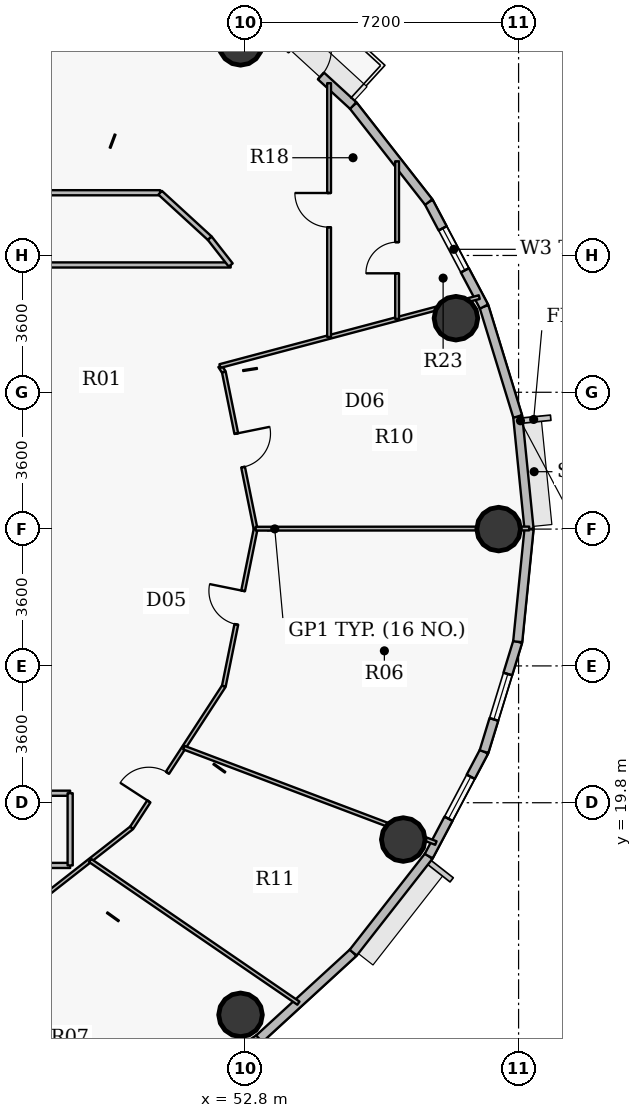
"""IFC4 building model, lengths in metres.
Left out: names, types, materials, properties, quantities, classifications, styles, units other than length and angle.
Written with IfcOpenShell. Run it as: python <this file> out.ifc"""

import sys

from ifc_helpers import new_model, si_unit, direction, frame, frame_2d, origin, origin_2d, place, context, subcontext, project, spatial, rectangle, hollow_circle, extrude, source, transform, mapped, element, fill, save


model = new_model("IFC4")
c1 = context("Model", 3, precision=1e-05, world=origin(), true_north=direction((0.0, 1.0)))
c2 = subcontext(c1, "Body", "Model", "MODEL_VIEW")
j1 = project(units=[si_unit("LENGTHUNIT", "METRE"), si_unit("PLANEANGLEUNIT", "RADIAN")], contexts=[c1])
p1 = place(None, origin())
s1 = spatial("IfcSite", under=j1, at=p1, CompositionType="ELEMENT")
p2 = place(p1, origin())
s2 = spatial("IfcBuilding", under=s1, at=p2, CompositionType="ELEMENT")
p3 = place(p2, frame((0.0, 0.0, 247.8)))
s3 = spatial("IfcBuildingStorey", under=s2, at=p3, CompositionType="ELEMENT", Elevation=247.8)
for number, where, z_axis, x_axis in (
    (1, (59.475, 27.0, 0.0), (0.0, 0.0, 1.0), (1.0, 0.0, 0.0)),
    (2, (58.351, 32.549, 0.0), (0.0, 0.0, 1.0), (1.0, 0.0, 0.0)),
    (3, (52.683, 39.781, 0.0), (0.0, 0.0, 1.0), (1.0, 0.0, 0.0)),
    (4, (52.683, 14.219, 0.0), (0.0, 0.0, 1.0), (1.0, 0.0, 0.0)),
    (5, (56.965, 18.831, 0.0), (0.0, 0.0, 1.0), (1.0, 0.0, 0.0)),
):
    element("IfcColumn", number, at=place(p3, frame(where, z_axis=z_axis, x_axis=x_axis)), inside=s3, PredefinedType="COLUMN", context=c2, shape_type="SweptSolid", body=[
        extrude(hollow_circle(Radius=0.575, WallThickness=0.036, at=origin_2d()), origin(), (0.0, 0.0, 1.0), 3.75),
    ])
p4 = place(p3, frame((59.977, 29.964, 0.0), z_axis=(0.0, 0.0, 1.0), x_axis=(0.099990595253, -0.994988382274, 0.0)))
e6 = element("IfcWall", 6, at=p4, inside=s3, PredefinedType="SOLIDWALL", context=c2, shape_type="SweptSolid", body=[
    extrude(rectangle(XDim=2.979, YDim=0.24, at=frame_2d((1.489, 0.0))), origin(), (0.0, 0.0, 1.0), 3.5),
])
p5 = place(p3, frame((59.09, 32.856, 0.0), z_axis=(0.0, 0.0, 1.0), x_axis=(0.293132907334, -0.95607170162, 0.0)))
e7 = element("IfcWall", 7, at=p5, inside=s3, PredefinedType="SOLIDWALL", context=c2, shape_type="SweptSolid", body=[
    extrude(rectangle(XDim=3.025, YDim=0.24, at=frame_2d((1.512, 0.0))), origin(), (0.0, 0.0, 1.0), 3.5),
])
p6 = place(p3, frame((57.636, 35.605, 0.0), z_axis=(0.0, 0.0, 1.0), x_axis=(0.46766049993, -0.883908172157, 0.0)))
e8 = element("IfcWall", 8, at=p6, inside=s3, PredefinedType="SOLIDWALL", context=c2, shape_type="SweptSolid", body=[
    extrude(rectangle(XDim=3.11, YDim=0.24, at=frame_2d((1.555, 0.0))), origin(), (0.0, 0.0, 1.0), 3.5),
])
p7 = place(p6, frame((0.782, 0.0, 0.9)))
e9 = element("IfcOpeningElement", 9, at=p7, cuts=e8, PredefinedType="OPENING", context=c2, shape_type="SweptSolid", body=[
    extrude(rectangle(XDim=1.25, YDim=1.65, at=origin_2d()), frame((0.625, 0.13, 0.825), z_axis=(0.0, -1.0, 0.0), x_axis=(1.0, 0.0, 0.0)), (0.0, 0.0, 1.0), 0.26),
])
p8 = place(p3, frame((55.648, 38.145, 0.0), z_axis=(0.0, 0.0, 1.0), x_axis=(0.616312344705, -0.787501805562, 0.0)))
e10 = element("IfcWall", 10, at=p8, inside=s3, PredefinedType="SOLIDWALL", context=c2, shape_type="SweptSolid", body=[
    extrude(rectangle(XDim=3.225, YDim=0.24, at=frame_2d((1.612, 0.0))), origin(), (0.0, 0.0, 1.0), 3.5),
])
p9 = place(p3, frame((53.176, 40.411, 0.0), z_axis=(0.0, 0.0, 1.0), x_axis=(0.737123922599, -0.675757591694, 0.0)))
e11 = element("IfcWall", 11, at=p9, inside=s3, PredefinedType="SOLIDWALL", context=c2, shape_type="SweptSolid", body=[
    extrude(rectangle(XDim=3.354, YDim=0.24, at=frame_2d((1.677, 0.0))), origin(), (0.0, 0.0, 1.0), 3.5),
])
p10 = place(p9, frame((1.152, 0.0, 0.0)))
e12 = element("IfcOpeningElement", 12, at=p10, cuts=e11, PredefinedType="OPENING", context=c2, shape_type="SweptSolid", body=[
    extrude(rectangle(XDim=1.05, YDim=2.15, at=origin_2d()), frame((0.525, 0.13, 1.075), z_axis=(0.0, -1.0, 0.0), x_axis=(1.0, 0.0, 0.0)), (0.0, 0.0, 1.0), 0.26),
])
p11 = place(p3, frame((53.176, 13.589, 0.0), z_axis=(0.0, 0.0, 1.0), x_axis=(-0.831262496074, -0.555880079352, 0.0)))
e13 = element("IfcWall", 13, at=p11, inside=s3, PredefinedType="SOLIDWALL", context=c2, shape_type="SweptSolid", body=[
    extrude(rectangle(XDim=3.484, YDim=0.24, at=frame_2d((1.742, 0.0))), origin(), (0.0, 0.0, 1.0), 3.5),
])
p12 = place(p3, frame((55.648, 15.855, 0.0), z_axis=(0.0, 0.0, 1.0), x_axis=(-0.737123922599, -0.675757591694, 0.0)))
e14 = element("IfcWall", 14, at=p12, inside=s3, PredefinedType="SOLIDWALL", context=c2, shape_type="SweptSolid", body=[
    extrude(rectangle(XDim=3.354, YDim=0.24, at=frame_2d((1.677, 0.0))), origin(), (0.0, 0.0, 1.0), 3.5),
])
p13 = place(p3, frame((57.636, 18.395, 0.0), z_axis=(0.0, 0.0, 1.0), x_axis=(-0.616312344705, -0.787501805562, 0.0)))
e15 = element("IfcWall", 15, at=p13, inside=s3, PredefinedType="SOLIDWALL", context=c2, shape_type="SweptSolid", body=[
    extrude(rectangle(XDim=3.225, YDim=0.24, at=frame_2d((1.612, 0.0))), origin(), (0.0, 0.0, 1.0), 3.5),
])
p14 = place(p3, frame((59.09, 21.144, 0.0), z_axis=(0.0, 0.0, 1.0), x_axis=(-0.46766049993, -0.883908172157, 0.0)))
e16 = element("IfcWall", 16, at=p14, inside=s3, PredefinedType="SOLIDWALL", context=c2, shape_type="SweptSolid", body=[
    extrude(rectangle(XDim=3.11, YDim=0.24, at=frame_2d((1.555, 0.0))), origin(), (0.0, 0.0, 1.0), 3.5),
])
p15 = place(p14, frame((0.748, 0.0, 0.9)))
e17 = element("IfcOpeningElement", 17, at=p15, cuts=e16, PredefinedType="OPENING", context=c2, shape_type="SweptSolid", body=[
    extrude(rectangle(XDim=1.25, YDim=1.65, at=origin_2d()), frame((0.625, 0.13, 0.825), z_axis=(0.0, -1.0, 0.0), x_axis=(1.0, 0.0, 0.0)), (0.0, 0.0, 1.0), 0.26),
])
p16 = place(p3, frame((59.977, 24.036, 0.0), z_axis=(0.0, 0.0, 1.0), x_axis=(-0.293132907334, -0.95607170162, 0.0)))
e18 = element("IfcWall", 18, at=p16, inside=s3, PredefinedType="SOLIDWALL", context=c2, shape_type="SweptSolid", body=[
    extrude(rectangle(XDim=3.025, YDim=0.24, at=frame_2d((1.512, 0.0))), origin(), (0.0, 0.0, 1.0), 3.5),
])
p17 = place(p16, frame((0.887, 0.0, 0.9)))
e19 = element("IfcOpeningElement", 19, at=p17, cuts=e18, PredefinedType="OPENING", context=c2, shape_type="SweptSolid", body=[
    extrude(rectangle(XDim=1.25, YDim=1.65, at=origin_2d()), frame((0.625, 0.13, 0.825), z_axis=(0.0, -1.0, 0.0), x_axis=(1.0, 0.0, 0.0)), (0.0, 0.0, 1.0), 0.26),
])
p18 = place(p3, frame((60.275, 27.0, 0.0), z_axis=(0.0, 0.0, 1.0), x_axis=(-0.099990595253, -0.994988382274, 0.0)))
e20 = element("IfcWall", 20, at=p18, inside=s3, PredefinedType="SOLIDWALL", context=c2, shape_type="SweptSolid", body=[
    extrude(rectangle(XDim=2.979, YDim=0.24, at=frame_2d((1.489, 0.0))), origin(), (0.0, 0.0, 1.0), 3.5),
])
p19 = place(p3, frame((24.35, 18.15, 0.0), z_axis=(0.0, 0.0, 1.0), x_axis=(1.0, 0.0, 0.0)))
e21 = element("IfcWall", 21, at=p19, inside=s3, PredefinedType="PARTITIONING", context=c2, shape_type="SweptSolid", body=[
    extrude(rectangle(XDim=23.85, YDim=0.135, at=frame_2d((11.925, 0.0))), origin(), (0.0, 0.0, 1.0), 2.935),
])
p20 = place(p19, frame((10.168, 0.0, 0.0)))
e22 = element("IfcOpeningElement", 22, at=p20, cuts=e21, PredefinedType="OPENING", context=c2, shape_type="SweptSolid", body=[
    extrude(rectangle(XDim=1.0, YDim=2.15, at=origin_2d()), frame((0.5, 0.078, 1.075), z_axis=(0.0, -1.0, 0.0), x_axis=(1.0, 0.0, 0.0)), (0.0, 0.0, 1.0), 0.155),
])
p21 = place(p3, frame((24.35, 35.85, 0.0), z_axis=(0.0, 0.0, 1.0), x_axis=(1.0, 0.0, 0.0)))
e23 = element("IfcWall", 23, at=p21, inside=s3, PredefinedType="PARTITIONING", context=c2, shape_type="SweptSolid", body=[
    extrude(rectangle(XDim=26.218, YDim=0.135, at=frame_2d((13.109, 0.0))), origin(), (0.0, 0.0, 1.0), 2.935),
])
p22 = place(p21, frame((22.062, 0.0, 0.0)))
e24 = element("IfcOpeningElement", 24, at=p22, cuts=e23, PredefinedType="OPENING", context=c2, shape_type="SweptSolid", body=[
    extrude(rectangle(XDim=1.0, YDim=2.15, at=origin_2d()), frame((0.5, 0.078, 1.075), z_axis=(0.0, -1.0, 0.0), x_axis=(1.0, 0.0, 0.0)), (0.0, 0.0, 1.0), 0.155),
])
p23 = place(p21, frame((11.214, 0.0, 0.0)))
e25 = element("IfcOpeningElement", 25, at=p23, cuts=e23, PredefinedType="OPENING", context=c2, shape_type="SweptSolid", body=[
    extrude(rectangle(XDim=1.0, YDim=2.15, at=origin_2d()), frame((0.5, 0.078, 1.075), z_axis=(0.0, -1.0, 0.0), x_axis=(1.0, 0.0, 0.0)), (0.0, 0.0, 1.0), 0.155),
])
p24 = place(p3, frame((43.295, 35.85, 0.0), z_axis=(0.0, 0.0, 1.0), x_axis=(0.636076542552, 0.771625966395, 0.0)))
e26 = element("IfcWall", 26, at=p24, inside=s3, PredefinedType="PARTITIONING", context=c2, shape_type="SweptSolid", body=[
    extrude(rectangle(XDim=9.151, YDim=0.135, at=frame_2d((4.576, 0.0))), origin(), (0.0, 0.0, 1.0), 2.985),
])
p25 = place(p3, frame((45.8, 20.05, 0.0), z_axis=(0.0, 0.0, 1.0), x_axis=(1.0, 0.0, 0.0)))
e27 = element("IfcWall", 27, at=p25, inside=s3, PredefinedType="PARTITIONING", context=c2, shape_type="SweptSolid", body=[
    extrude(rectangle(XDim=2.4, YDim=0.135, at=frame_2d((1.2, 0.0))), origin(), (0.0, 0.0, 1.0), 3.5),
])
p26 = place(p3, frame((45.8, 33.95, 0.0), z_axis=(0.0, 0.0, 1.0), x_axis=(1.0, 0.0, 0.0)))
e28 = element("IfcWall", 28, at=p26, inside=s3, PredefinedType="PARTITIONING", context=c2, shape_type="SweptSolid", body=[
    extrude(rectangle(XDim=6.624, YDim=0.135, at=frame_2d((3.312, 0.0))), origin(), (0.0, 0.0, 1.0), 3.5),
])
p27 = place(p3, frame((46.039, 16.181, 0.0), z_axis=(0.0, 0.0, 1.0), x_axis=(0.787367569585, 0.616483828147, 0.0)))
e29 = element("IfcWall", 29, at=p27, inside=s3, PredefinedType="PARTITIONING", context=c2, shape_type="SweptSolid", body=[
    extrude(rectangle(XDim=4.799, YDim=0.1, at=frame_2d((2.399, 0.0))), origin(), (0.0, 0.0, 1.0), 2.935),
])
p28 = place(p27, frame((0.582, 0.0, 0.0)))
e30 = element("IfcOpeningElement", 30, at=p28, cuts=e29, PredefinedType="OPENING", context=c2, shape_type="SweptSolid", body=[
    extrude(rectangle(XDim=0.9, YDim=2.1, at=origin_2d()), frame((0.45, 0.06, 1.05), z_axis=(0.0, -1.0, 0.0), x_axis=(1.0, 0.0, 0.0)), (0.0, 0.0, 1.0), 0.12),
])
p29 = place(p3, frame((48.2, 18.15, 0.0), z_axis=(0.0, 0.0, 1.0), x_axis=(0.0, 1.0, 0.0)))
e31 = element("IfcWall", 31, at=p29, inside=s3, PredefinedType="PARTITIONING", context=c2, shape_type="SweptSolid", body=[
    extrude(rectangle(XDim=1.9, YDim=0.135, at=frame_2d((0.95, 0.0))), origin(), (0.0, 0.0, 1.0), 3.5),
])
p30 = place(p3, frame((48.724, 18.283, 0.0), z_axis=(0.0, 0.0, 1.0), x_axis=(0.824946647061, -0.565210606325, 0.0)))
e32 = element("IfcWall", 32, at=p30, inside=s3, PredefinedType="PARTITIONING", context=c2, shape_type="SweptSolid", body=[
    extrude(rectangle(XDim=6.646, YDim=0.1, at=frame_2d((3.323, 0.0))), origin(), (0.0, 0.0, 1.0), 2.985),
])
p31 = place(p3, frame((49.818, 19.139, 0.0), z_axis=(0.0, 0.0, 1.0), x_axis=(0.545406924684, 0.83817139447, 0.0)))
e33 = element("IfcWall", 33, at=p31, inside=s3, PredefinedType="PARTITIONING", context=c2, shape_type="SweptSolid", body=[
    extrude(rectangle(XDim=4.448, YDim=0.1, at=frame_2d((2.224, 0.0))), origin(), (0.0, 0.0, 1.0), 2.935),
])
p32 = place(p31, frame((0.829, 0.0, 0.0)))
e34 = element("IfcOpeningElement", 34, at=p32, cuts=e33, PredefinedType="OPENING", context=c2, shape_type="SweptSolid", body=[
    extrude(rectangle(XDim=0.9, YDim=2.1, at=origin_2d()), frame((0.45, 0.06, 1.05), z_axis=(0.0, -1.0, 0.0), x_axis=(1.0, 0.0, 0.0)), (0.0, 0.0, 1.0), 0.12),
])
p33 = place(p3, frame((50.568, 35.85, 0.0), z_axis=(0.0, 0.0, 1.0), x_axis=(0.737102657331, -0.675780787353, 0.0)))
e35 = element("IfcWall", 35, at=p33, inside=s3, PredefinedType="PARTITIONING", context=c2, shape_type="SweptSolid", body=[
    extrude(rectangle(XDim=1.772, YDim=0.135, at=frame_2d((0.886, 0.0))), origin(), (0.0, 0.0, 1.0), 3.5),
])
p34 = place(p3, frame((51.192, 21.25, 0.0), z_axis=(0.0, 0.0, 1.0), x_axis=(0.935252375815, -0.353981628806, 0.0)))
e36 = element("IfcWall", 36, at=p34, inside=s3, PredefinedType="PARTITIONING", context=c2, shape_type="SweptSolid", body=[
    extrude(rectangle(XDim=7.092, YDim=0.1, at=frame_2d((3.546, 0.0))), origin(), (0.0, 0.0, 1.0), 2.935),
])
p35 = place(p3, frame((51.874, 34.653, 0.0), z_axis=(0.0, 0.0, 1.0), x_axis=(0.61628613448, -0.787522317429, 0.0)))
e37 = element("IfcWall", 37, at=p35, inside=s3, PredefinedType="PARTITIONING", context=c2, shape_type="SweptSolid", body=[
    extrude(rectangle(XDim=0.893, YDim=0.135, at=frame_2d((0.446, 0.0))), origin(), (0.0, 0.0, 1.0), 3.5),
])
p36 = place(p3, frame((52.142, 31.29, 0.0), z_axis=(0.0, 0.0, 1.0), x_axis=(0.545079581712, -0.838384309014, 0.0)))
e38 = element("IfcWall", 38, at=p36, inside=s3, PredefinedType="PARTITIONING", context=c2, shape_type="SweptSolid", body=[
    extrude(rectangle(XDim=0.188, YDim=0.1, at=frame_2d((0.094, 0.0))), origin(), (0.0, 0.0, 1.0), 2.935),
])
p37 = place(p3, frame((52.142, 31.29, 0.0), z_axis=(0.0, 0.0, 1.0), x_axis=(0.966448115653, 0.256861907939, 0.0)))
e39 = element("IfcWall", 39, at=p37, inside=s3, PredefinedType="PARTITIONING", context=c2, shape_type="SweptSolid", body=[
    extrude(rectangle(XDim=7.06, YDim=0.1, at=frame_2d((3.53, 0.0))), origin(), (0.0, 0.0, 1.0), 2.985),
])
p38 = place(p3, frame((52.244, 22.867, 0.0), z_axis=(0.0, 0.0, 1.0), x_axis=(0.198264809747, 0.980148491411, 0.0)))
e40 = element("IfcWall", 40, at=p38, inside=s3, PredefinedType="PARTITIONING", context=c2, shape_type="SweptSolid", body=[
    extrude(rectangle(XDim=4.216, YDim=0.1, at=frame_2d((2.108, 0.0))), origin(), (0.0, 0.0, 1.0), 2.935),
])
p39 = place(p38, frame((1.658, 0.0, 0.0)))
e41 = element("IfcOpeningElement", 41, at=p39, cuts=e40, PredefinedType="OPENING", context=c2, shape_type="SweptSolid", body=[
    extrude(rectangle(XDim=0.9, YDim=2.1, at=origin_2d()), frame((0.45, 0.06, 1.05), z_axis=(0.0, -1.0, 0.0), x_axis=(1.0, 0.0, 0.0)), (0.0, 0.0, 1.0), 0.12),
])
p40 = place(p3, frame((52.244, 31.133, 0.0), z_axis=(0.0, 0.0, 1.0), x_axis=(0.198259251193, -0.980149615781, 0.0)))
e42 = element("IfcWall", 42, at=p40, inside=s3, PredefinedType="PARTITIONING", context=c2, shape_type="SweptSolid", body=[
    extrude(rectangle(XDim=4.205, YDim=0.1, at=frame_2d((2.103, 0.0))), origin(), (0.0, 0.0, 1.0), 2.935),
])
p41 = place(p40, frame((1.653, 0.0, 0.0)))
e43 = element("IfcOpeningElement", 43, at=p41, cuts=e42, PredefinedType="OPENING", context=c2, shape_type="SweptSolid", body=[
    extrude(rectangle(XDim=0.9, YDim=2.1, at=origin_2d()), frame((0.45, 0.06, 1.05), z_axis=(0.0, -1.0, 0.0), x_axis=(1.0, 0.0, 0.0)), (0.0, 0.0, 1.0), 0.12),
])
p42 = place(p3, frame((53.082, 27.011, 0.0), z_axis=(0.0, 0.0, 1.0), x_axis=(0.999999792251, 0.000644592077, 0.0)))
e44 = element("IfcWall", 44, at=p42, inside=s3, PredefinedType="PARTITIONING", context=c2, shape_type="SweptSolid", body=[
    extrude(rectangle(XDim=7.196, YDim=0.1, at=frame_2d((3.598, 0.0))), origin(), (0.0, 0.0, 1.0), 2.935),
])
p43 = place(p3, frame((55.014, 32.053, 0.0), z_axis=(0.0, 0.0, 1.0), x_axis=(0.0, 1.0, 0.0)))
e45 = element("IfcWall", 45, at=p43, inside=s3, PredefinedType="PARTITIONING", context=c2, shape_type="SweptSolid", body=[
    extrude(rectangle(XDim=6.68, YDim=0.1, at=frame_2d((3.34, 0.0))), origin(), (0.0, 0.0, 1.0), 2.985),
])
p44 = place(p43, frame((2.89, 0.0, 0.0)))
e46 = element("IfcOpeningElement", 46, at=p44, cuts=e45, PredefinedType="OPENING", context=c2, shape_type="SweptSolid", body=[
    extrude(rectangle(XDim=0.9, YDim=2.1, at=origin_2d()), frame((0.45, 0.06, 1.05), z_axis=(0.0, -1.0, 0.0), x_axis=(1.0, 0.0, 0.0)), (0.0, 0.0, 1.0), 0.12),
])
p45 = place(p3, frame((56.803, 32.529, 0.0), z_axis=(0.0, 0.0, 1.0), x_axis=(0.0, 1.0, 0.0)))
e47 = element("IfcWall", 47, at=p45, inside=s3, PredefinedType="PARTITIONING", context=c2, shape_type="SweptSolid", body=[
    extrude(rectangle(XDim=4.148, YDim=0.1, at=frame_2d((2.074, 0.0))), origin(), (0.0, 0.0, 1.0), 2.985),
])
p46 = place(p45, frame((1.201, 0.0, 0.0)))
e48 = element("IfcOpeningElement", 48, at=p46, cuts=e47, PredefinedType="OPENING", context=c2, shape_type="SweptSolid", body=[
    extrude(rectangle(XDim=0.82, YDim=2.1, at=origin_2d()), frame((0.41, 0.06, 1.05), z_axis=(0.0, -1.0, 0.0), x_axis=(1.0, 0.0, 0.0)), (0.0, 0.0, 1.0), 0.12),
])
m1 = source(origin(), c2, "Body", "SweptSolid", [
    extrude(rectangle(XDim=1.25, YDim=1.65, at=origin_2d()), frame((0.625, 0.03, 0.825), z_axis=(0.0, -1.0, 0.0), x_axis=(1.0, 0.0, 0.0)), (0.0, 0.0, 1.0), 0.06),
])
p47 = place(p7, origin())
e49 = element("IfcWindow", 49, at=p47, inside=s3, PartitioningType="SINGLE_PANEL", PredefinedType="WINDOW", context=c2, shape_type="MappedRepresentation", body=[
    mapped(m1, transform((0.0, 0.0, 0.0), x_axis=(1.0, 0.0, 0.0), y_axis=(0.0, 1.0, 0.0), z_axis=(0.0, 0.0, 1.0), scale=1.0)),
])
fill(e9, e49)
m2 = source(origin(), c2, "Body", "SweptSolid", [
    extrude(rectangle(XDim=1.05, YDim=2.15, at=origin_2d()), frame((0.525, 0.025, 1.075), z_axis=(0.0, -1.0, 0.0), x_axis=(1.0, 0.0, 0.0)), (0.0, 0.0, 1.0), 0.05),
])
p48 = place(p10, origin())
e50 = element("IfcDoor", 50, at=p48, inside=s3, OperationType="SINGLE_SWING_LEFT", PredefinedType="DOOR", context=c2, shape_type="MappedRepresentation", body=[
    mapped(m2, transform((0.0, 0.0, 0.0), x_axis=(1.0, 0.0, 0.0), y_axis=(0.0, 1.0, 0.0), z_axis=(0.0, 0.0, 1.0), scale=1.0)),
])
fill(e12, e50)
p49 = place(p15, origin())
e51 = element("IfcWindow", 51, at=p49, inside=s3, PartitioningType="SINGLE_PANEL", PredefinedType="WINDOW", context=c2, shape_type="MappedRepresentation", body=[
    mapped(m1, transform((0.0, 0.0, 0.0), x_axis=(1.0, 0.0, 0.0), y_axis=(0.0, 1.0, 0.0), z_axis=(0.0, 0.0, 1.0), scale=1.0)),
])
fill(e17, e51)
p50 = place(p17, origin())
e52 = element("IfcWindow", 52, at=p50, inside=s3, PartitioningType="SINGLE_PANEL", PredefinedType="WINDOW", context=c2, shape_type="MappedRepresentation", body=[
    mapped(m1, transform((0.0, 0.0, 0.0), x_axis=(1.0, 0.0, 0.0), y_axis=(0.0, 1.0, 0.0), z_axis=(0.0, 0.0, 1.0), scale=1.0)),
])
fill(e19, e52)
m3 = source(origin(), c2, "Body", "SweptSolid", [
    extrude(rectangle(XDim=0.9, YDim=2.1, at=origin_2d()), frame((0.45, 0.025, 1.05), z_axis=(0.0, -1.0, 0.0), x_axis=(1.0, 0.0, 0.0)), (0.0, 0.0, 1.0), 0.05),
])
p51 = place(p32, origin())
e53 = element("IfcDoor", 53, at=p51, inside=s3, OperationType="SINGLE_SWING_LEFT", PredefinedType="DOOR", context=c2, shape_type="MappedRepresentation", body=[
    mapped(m3, transform((0.0, 0.0, 0.0), x_axis=(1.0, 0.0, 0.0), y_axis=(0.0, 1.0, 0.0), z_axis=(0.0, 0.0, 1.0), scale=1.0)),
])
fill(e34, e53)
p52 = place(p39, origin())
e54 = element("IfcDoor", 54, at=p52, inside=s3, OperationType="SINGLE_SWING_RIGHT", PredefinedType="DOOR", context=c2, shape_type="MappedRepresentation", body=[
    mapped(m3, transform((0.0, 0.0, 0.0), x_axis=(1.0, 0.0, 0.0), y_axis=(0.0, 1.0, 0.0), z_axis=(0.0, 0.0, 1.0), scale=1.0)),
])
fill(e41, e54)
p53 = place(p41, origin())
e55 = element("IfcDoor", 55, at=p53, inside=s3, OperationType="SINGLE_SWING_LEFT", PredefinedType="DOOR", context=c2, shape_type="MappedRepresentation", body=[
    mapped(m3, transform((0.0, 0.0, 0.0), x_axis=(1.0, 0.0, 0.0), y_axis=(0.0, 1.0, 0.0), z_axis=(0.0, 0.0, 1.0), scale=1.0)),
])
fill(e43, e55)
p54 = place(p44, origin())
e56 = element("IfcDoor", 56, at=p54, inside=s3, OperationType="SINGLE_SWING_RIGHT", PredefinedType="DOOR", context=c2, shape_type="MappedRepresentation", body=[
    mapped(m3, transform((0.0, 0.0, 0.0), x_axis=(1.0, 0.0, 0.0), y_axis=(0.0, 1.0, 0.0), z_axis=(0.0, 0.0, 1.0), scale=1.0)),
])
fill(e46, e56)
m4 = source(origin(), c2, "Body", "SweptSolid", [
    extrude(rectangle(XDim=0.82, YDim=2.1, at=origin_2d()), frame((0.41, 0.025, 1.05), z_axis=(0.0, -1.0, 0.0), x_axis=(1.0, 0.0, 0.0)), (0.0, 0.0, 1.0), 0.05),
])
p55 = place(p46, origin())
e57 = element("IfcDoor", 57, at=p55, inside=s3, OperationType="SINGLE_SWING_LEFT", PredefinedType="DOOR", context=c2, shape_type="MappedRepresentation", body=[
    mapped(m4, transform((0.0, 0.0, 0.0), x_axis=(1.0, 0.0, 0.0), y_axis=(0.0, 1.0, 0.0), z_axis=(0.0, 0.0, 1.0), scale=1.0)),
])
fill(e48, e57)
save(model, sys.argv[1])
